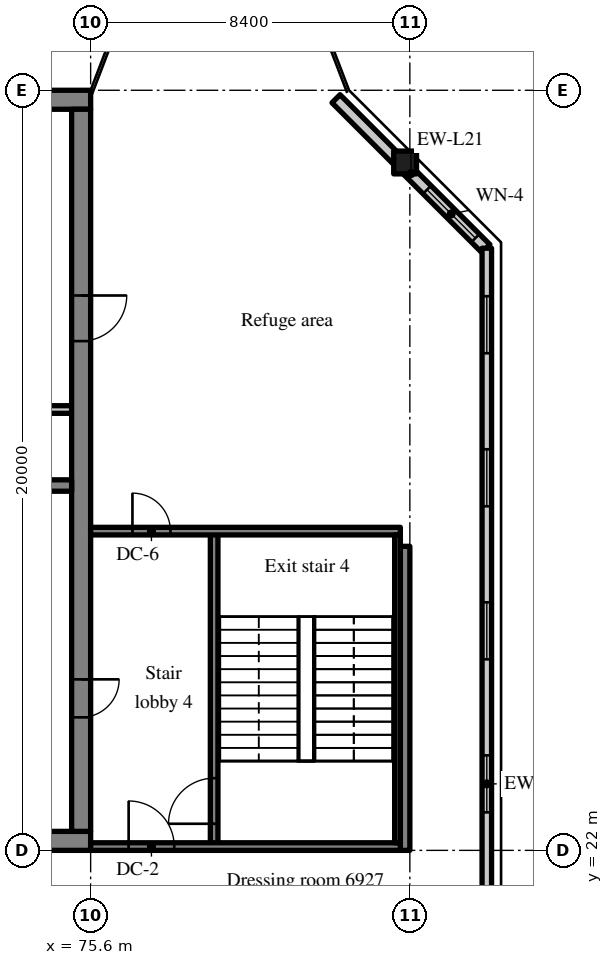
"""IFC4 building model, lengths in metres.
Left out: names, types, materials, properties, quantities, classifications, styles, units other than length and angle.
Written with IfcOpenShell. Run it as: python <this file> out.ifc"""

import sys

from ifc_helpers import new_model, si_unit, direction, frame, frame_2d, origin, origin_2d, place, context, subcontext, project, spatial, rectangle, extrude, source, transform, mapped, element, fill, save


model = new_model("IFC4")
c1 = context("Model", 3, precision=1e-05, world=origin(), true_north=direction((0.0, 1.0)))
c2 = subcontext(c1, "Body", "Model", "MODEL_VIEW")
j1 = project(units=[si_unit("LENGTHUNIT", "METRE"), si_unit("PLANEANGLEUNIT", "RADIAN")], contexts=[c1])
p1 = place(None, origin())
s1 = spatial("IfcSite", under=j1, at=p1, CompositionType="ELEMENT")
p2 = place(p1, origin())
s2 = spatial("IfcBuilding", under=s1, at=p2, CompositionType="ELEMENT")
p3 = place(p2, frame((0.0, 0.0, 289.7)))
s3 = spatial("IfcBuildingStorey", under=s2, at=p3, CompositionType="ELEMENT", Elevation=289.7)
m1 = source(origin(), c2, "Body", "SweptSolid", [
    extrude(rectangle(XDim=50.4, YDim=0.5, at=frame_2d((25.2, 0.0))), origin(), (0.0, 0.0, 1.0), 3.72),
])
p4 = place(p3, frame((25.2, 22.25, 0.0), z_axis=(0.0, 0.0, 1.0), x_axis=(1.0, 0.0, 0.0)))
e1 = element("IfcWall", 1, at=p4, inside=s3, PredefinedType="SHEAR", context=c2, shape_type="MappedRepresentation", body=[
    mapped(m1, transform((0.0, 0.0, 0.0), scale=1.0)),
])
m2 = source(origin(), c2, "Body", "SweptSolid", [
    extrude(rectangle(XDim=1.8, YDim=2.1, at=frame_2d((0.9, 1.05))), frame((0.0, 0.26, 0.0), z_axis=(0.0, -1.0, 0.0), x_axis=(1.0, 0.0, 0.0)), (0.0, 0.0, 1.0), 0.52),
])
p5 = place(p4, frame((15.9, 0.0, 0.0)))
e2 = element("IfcOpeningElement", 2, at=p5, cuts=e1, PredefinedType="OPENING", context=c2, shape_type="MappedRepresentation", body=[
    mapped(m2, transform((0.0, 0.0, 0.0), scale=1.0)),
])
m3 = source(origin(), c2, "Body", "SweptSolid", [
    extrude(rectangle(XDim=0.9, YDim=2.1, at=frame_2d((0.45, 1.05))), frame((0.0, 0.26, 0.0), z_axis=(0.0, -1.0, 0.0), x_axis=(1.0, 0.0, 0.0)), (0.0, 0.0, 1.0), 0.52),
])
p6 = place(p4, frame((9.675, 0.0, 0.0)))
e3 = element("IfcOpeningElement", 3, at=p6, cuts=e1, PredefinedType="OPENING", context=c2, shape_type="MappedRepresentation", body=[
    mapped(m3, transform((0.0, 0.0, 0.0), scale=1.0)),
])
p7 = place(p4, frame((21.525, 0.0, 0.0)))
e4 = element("IfcOpeningElement", 4, at=p7, cuts=e1, PredefinedType="OPENING", context=c2, shape_type="MappedRepresentation", body=[
    mapped(m3, transform((0.0, 0.0, 0.0), scale=1.0)),
])
p8 = place(p4, frame((32.7, 0.0, 0.0)))
e5 = element("IfcOpeningElement", 5, at=p8, cuts=e1, PredefinedType="OPENING", context=c2, shape_type="MappedRepresentation", body=[
    mapped(m2, transform((0.0, 0.0, 0.0), scale=1.0)),
])
m4 = source(origin(), c2, "Body", "SweptSolid", [
    extrude(rectangle(XDim=1.2, YDim=2.1, at=frame_2d((0.6, 1.05))), frame((0.0, 0.26, 0.0), z_axis=(0.0, -1.0, 0.0), x_axis=(1.0, 0.0, 0.0)), (0.0, 0.0, 1.0), 0.52),
])
p9 = place(p4, frame((6.5, 0.0, 0.0)))
e6 = element("IfcOpeningElement", 6, at=p9, cuts=e1, PredefinedType="OPENING", context=c2, shape_type="MappedRepresentation", body=[
    mapped(m4, transform((0.0, 0.0, 0.0), scale=1.0)),
])
p10 = place(p4, frame((47.975, 0.0, 0.0)))
e7 = element("IfcOpeningElement", 7, at=p10, cuts=e1, PredefinedType="OPENING", context=c2, shape_type="MappedRepresentation", body=[
    mapped(m4, transform((0.0, 0.0, 0.0), scale=1.0)),
])
p11 = place(p3, frame((25.2, 41.75, 0.0), z_axis=(0.0, 0.0, 1.0), x_axis=(1.0, 0.0, 0.0)))
e8 = element("IfcWall", 8, at=p11, inside=s3, PredefinedType="SHEAR", context=c2, shape_type="MappedRepresentation", body=[
    mapped(m1, transform((0.0, 0.0, 0.0), scale=1.0)),
])
m5 = source(origin(), c2, "Body", "SweptSolid", [
    extrude(rectangle(XDim=19.0, YDim=0.5, at=frame_2d((9.5, 0.0))), origin(), (0.0, 0.0, 1.0), 3.72),
])
p12 = place(p3, frame((75.35, 22.5, 0.0), z_axis=(0.0, 0.0, 1.0), x_axis=(0.0, 1.0, 0.0)))
e9 = element("IfcWall", 9, at=p12, inside=s3, PredefinedType="SHEAR", context=c2, shape_type="MappedRepresentation", body=[
    mapped(m5, transform((0.0, 0.0, 0.0), scale=1.0)),
])
m6 = source(origin(), c2, "Body", "SweptSolid", [
    extrude(rectangle(XDim=1.0, YDim=2.1, at=frame_2d((0.5, 1.05))), frame((0.0, 0.26, 0.0), z_axis=(0.0, -1.0, 0.0), x_axis=(1.0, 0.0, 0.0)), (0.0, 0.0, 1.0), 0.52),
])
p13 = place(p12, frame((3.0, 0.0, 0.0)))
e10 = element("IfcOpeningElement", 10, at=p13, cuts=e9, PredefinedType="OPENING", context=c2, shape_type="MappedRepresentation", body=[
    mapped(m6, transform((0.0, 0.0, 0.0), scale=1.0)),
])
p14 = place(p12, frame((12.9, 0.0, 0.0)))
e11 = element("IfcOpeningElement", 11, at=p14, cuts=e9, PredefinedType="OPENING", context=c2, shape_type="MappedRepresentation", body=[
    mapped(m4, transform((0.0, 0.0, 0.0), scale=1.0)),
])
m7 = source(origin(), c2, "Body", "SweptSolid", [
    extrude(rectangle(XDim=7.75, YDim=0.3, at=frame_2d((3.875, 0.0))), origin(), (0.0, 0.0, 1.0), 3.72),
])
p15 = place(p3, frame((67.35, 31.6, 0.0), z_axis=(0.0, 0.0, 1.0), x_axis=(1.0, 0.0, 0.0)))
e12 = element("IfcWall", 12, at=p15, inside=s3, PredefinedType="SHEAR", context=c2, shape_type="MappedRepresentation", body=[
    mapped(m7, transform((0.0, 0.0, 0.0), scale=1.0)),
])
m8 = source(origin(), c2, "Body", "SweptSolid", [
    extrude(rectangle(XDim=1.1, YDim=2.1, at=frame_2d((0.55, 1.05))), frame((0.0, 0.16, 0.0), z_axis=(0.0, -1.0, 0.0), x_axis=(1.0, 0.0, 0.0)), (0.0, 0.0, 1.0), 0.32),
])
p16 = place(p15, frame((5.875, 0.0, 0.0)))
e13 = element("IfcOpeningElement", 13, at=p16, cuts=e12, PredefinedType="OPENING", context=c2, shape_type="MappedRepresentation", body=[
    mapped(m8, transform((0.0, 0.0, 0.0), scale=1.0)),
])
m9 = source(origin(), c2, "Body", "SweptSolid", [
    extrude(rectangle(XDim=8.0, YDim=0.25, at=frame_2d((4.0, 0.0))), origin(), (0.0, 0.0, 1.0), 3.72),
])
p17 = place(p3, frame((83.875, 22.0, 0.0), z_axis=(0.0, 0.0, 1.0), x_axis=(0.0, 1.0, 0.0)))
e14 = element("IfcWall", 14, at=p17, inside=s3, PredefinedType="SHEAR", context=c2, shape_type="MappedRepresentation", body=[
    mapped(m9, transform((0.0, 0.0, 0.0), scale=1.0)),
])
m10 = source(origin(), c2, "Body", "SweptSolid", [
    extrude(rectangle(XDim=0.6, YDim=0.6, at=origin_2d()), origin(), (0.0, 0.0, 1.0), 3.72),
])
p18 = place(p3, frame((83.875, 40.1, 0.0), z_axis=(0.0, 0.0, 1.0), x_axis=(1.0, 0.0, 0.0)))
e15 = element("IfcColumn", 15, at=p18, inside=s3, PredefinedType="COLUMN", context=c2, shape_type="MappedRepresentation", body=[
    mapped(m10, transform((0.0, 0.0, 0.0), scale=1.0)),
])
m11 = source(origin(), c2, "Body", "SweptSolid", [
    extrude(rectangle(XDim=5.576, YDim=0.3, at=frame_2d((2.788, 0.0))), origin(), (0.0, 0.0, 1.0), 3.72),
])
p19 = place(p3, frame((86.0, 37.834, 0.0), z_axis=(0.0, 0.0, 1.0), x_axis=(-0.707106781187, 0.707106781187, 0.0)))
e16 = element("IfcWall", 16, at=p19, inside=s3, PredefinedType="SOLIDWALL", context=c2, shape_type="MappedRepresentation", body=[
    mapped(m11, transform((0.0, 0.0, 0.0), scale=1.0)),
])
m12 = source(origin(), c2, "Body", "SweptSolid", [
    extrude(rectangle(XDim=1.8, YDim=1.5, at=frame_2d((0.9, 0.75))), frame((0.0, 0.16, 0.0), z_axis=(0.0, -1.0, 0.0), x_axis=(1.0, 0.0, 0.0)), (0.0, 0.0, 1.0), 0.32),
])
p20 = place(p19, frame((0.39, 0.0, 0.9)))
e17 = element("IfcOpeningElement", 17, at=p20, cuts=e16, PredefinedType="OPENING", context=c2, shape_type="MappedRepresentation", body=[
    mapped(m12, transform((0.0, 0.0, 0.0), scale=1.0)),
])
m13 = source(origin(), c2, "Body", "SweptSolid", [
    extrude(rectangle(XDim=28.189, YDim=0.25, at=frame_2d((14.095, 0.0))), origin(), (0.0, 0.0, 1.0), 3.72),
])
p21 = place(p3, frame((86.025, 9.655, 0.0), z_axis=(0.0, 0.0, 1.0), x_axis=(0.0, 1.0, 0.0)))
e18 = element("IfcWall", 18, at=p21, inside=s3, PredefinedType="SOLIDWALL", context=c2, shape_type="MappedRepresentation", body=[
    mapped(m13, transform((0.0, 0.0, 0.0), scale=1.0)),
])
m14 = source(origin(), c2, "Body", "SweptSolid", [
    extrude(rectangle(XDim=1.5, YDim=1.5, at=frame_2d((0.75, 0.75))), frame((0.0, 0.135, 0.0), z_axis=(0.0, -1.0, 0.0), x_axis=(1.0, 0.0, 0.0)), (0.0, 0.0, 1.0), 0.27),
])
p22 = place(p21, frame((1.263, 0.0, 0.9)))
e19 = element("IfcOpeningElement", 19, at=p22, cuts=e18, PredefinedType="OPENING", context=c2, shape_type="MappedRepresentation", body=[
    mapped(m14, transform((0.0, 0.0, 0.0), scale=1.0)),
])
p23 = place(p21, frame((5.291, 0.0, 0.9)))
e20 = element("IfcOpeningElement", 20, at=p23, cuts=e18, PredefinedType="OPENING", context=c2, shape_type="MappedRepresentation", body=[
    mapped(m14, transform((0.0, 0.0, 0.0), scale=1.0)),
])
p24 = place(p21, frame((9.318, 0.0, 0.9)))
e21 = element("IfcOpeningElement", 21, at=p24, cuts=e18, PredefinedType="OPENING", context=c2, shape_type="MappedRepresentation", body=[
    mapped(m14, transform((0.0, 0.0, 0.0), scale=1.0)),
])
p25 = place(p21, frame((13.345, 0.0, 0.9)))
e22 = element("IfcOpeningElement", 22, at=p25, cuts=e18, PredefinedType="OPENING", context=c2, shape_type="MappedRepresentation", body=[
    mapped(m14, transform((0.0, 0.0, 0.0), scale=1.0)),
])
p26 = place(p21, frame((17.372, 0.0, 0.9)))
e23 = element("IfcOpeningElement", 23, at=p26, cuts=e18, PredefinedType="OPENING", context=c2, shape_type="MappedRepresentation", body=[
    mapped(m14, transform((0.0, 0.0, 0.0), scale=1.0)),
])
p27 = place(p21, frame((21.399, 0.0, 0.9)))
e24 = element("IfcOpeningElement", 24, at=p27, cuts=e18, PredefinedType="OPENING", context=c2, shape_type="MappedRepresentation", body=[
    mapped(m14, transform((0.0, 0.0, 0.0), scale=1.0)),
])
p28 = place(p21, frame((25.426, 0.0, 0.9)))
e25 = element("IfcOpeningElement", 25, at=p28, cuts=e18, PredefinedType="OPENING", context=c2, shape_type="MappedRepresentation", body=[
    mapped(m14, transform((0.0, 0.0, 0.0), scale=1.0)),
])
m15 = source(origin(), c2, "Body", "SweptSolid", [
    extrude(rectangle(XDim=2.65, YDim=0.2, at=frame_2d((1.325, 0.0))), origin(), (0.0, 0.0, 1.0), 3.72),
])
p29 = place(p3, frame((72.45, 33.6, 0.0), z_axis=(0.0, 0.0, 1.0), x_axis=(1.0, 0.0, 0.0)))
e26 = element("IfcWall", 26, at=p29, inside=s3, PredefinedType="SOLIDWALL", context=c2, shape_type="MappedRepresentation", body=[
    mapped(m15, transform((0.0, 0.0, 0.0), scale=1.0)),
])
m16 = source(origin(), c2, "Body", "SweptSolid", [
    extrude(rectangle(XDim=8.3, YDim=0.2, at=frame_2d((4.15, 0.0))), origin(), (0.0, 0.0, 1.0), 3.72),
])
p30 = place(p3, frame((78.85, 22.1, 0.0), z_axis=(0.0, 0.0, 1.0), x_axis=(0.0, 1.0, 0.0)))
e27 = element("IfcWall", 27, at=p30, inside=s3, PredefinedType="SOLIDWALL", context=c2, shape_type="MappedRepresentation", body=[
    mapped(m16, transform((0.0, 0.0, 0.0), scale=1.0)),
])
m17 = source(origin(), c2, "Body", "SweptSolid", [
    extrude(rectangle(XDim=1.2, YDim=2.1, at=frame_2d((0.6, 1.05))), frame((0.0, 0.11, 0.0), z_axis=(0.0, -1.0, 0.0), x_axis=(1.0, 0.0, 0.0)), (0.0, 0.0, 1.0), 0.22),
])
p31 = place(p30, frame((0.6, 0.0, 0.0)))
e28 = element("IfcOpeningElement", 28, at=p31, cuts=e27, PredefinedType="OPENING", context=c2, shape_type="MappedRepresentation", body=[
    mapped(m17, transform((0.0, 0.0, 0.0), scale=1.0)),
])
m18 = source(origin(), c2, "Body", "SweptSolid", [
    extrude(rectangle(XDim=8.15, YDim=0.2, at=frame_2d((4.075, 0.0))), origin(), (0.0, 0.0, 1.0), 3.72),
])
p32 = place(p3, frame((83.75, 22.1, 0.0), z_axis=(0.0, 0.0, 1.0), x_axis=(-1.0, 0.0, 0.0)))
e29 = element("IfcWall", 29, at=p32, inside=s3, PredefinedType="SOLIDWALL", context=c2, shape_type="MappedRepresentation", body=[
    mapped(m18, transform((0.0, 0.0, 0.0), scale=1.0)),
])
p33 = place(p32, frame((5.95, 0.0, 0.0)))
e30 = element("IfcOpeningElement", 30, at=p33, cuts=e29, PredefinedType="OPENING", context=c2, shape_type="MappedRepresentation", body=[
    mapped(m17, transform((0.0, 0.0, 0.0), scale=1.0)),
])
p34 = place(p3, frame((83.75, 30.4, 0.0), z_axis=(0.0, 0.0, 1.0), x_axis=(-1.0, 0.0, 0.0)))
e31 = element("IfcWall", 31, at=p34, inside=s3, PredefinedType="SOLIDWALL", context=c2, shape_type="MappedRepresentation", body=[
    mapped(m18, transform((0.0, 0.0, 0.0), scale=1.0)),
])
m19 = source(origin(), c2, "Body", "SweptSolid", [
    extrude(rectangle(XDim=1.0, YDim=2.1, at=frame_2d((0.5, 1.05))), frame((0.0, 0.11, 0.0), z_axis=(0.0, -1.0, 0.0), x_axis=(1.0, 0.0, 0.0)), (0.0, 0.0, 1.0), 0.22),
])
p35 = place(p34, frame((6.05, 0.0, 0.0)))
e32 = element("IfcOpeningElement", 32, at=p35, cuts=e31, PredefinedType="OPENING", context=c2, shape_type="MappedRepresentation", body=[
    mapped(m19, transform((0.0, 0.0, 0.0), scale=1.0)),
])
m20 = source(origin(), c2, "Body", "SweptSolid", [
    extrude(rectangle(XDim=8.1, YDim=0.15, at=frame_2d((4.05, 0.0))), origin(), (0.0, 0.0, 1.0), 3.72),
])
p36 = place(p3, frame((83.675, 22.2, 0.0), z_axis=(0.0, 0.0, 1.0), x_axis=(0.0, 1.0, 0.0)))
e33 = element("IfcWall", 33, at=p36, inside=s3, PredefinedType="SOLIDWALL", context=c2, shape_type="MappedRepresentation", body=[
    mapped(m20, transform((0.0, 0.0, 0.0), scale=1.0)),
])
m21 = source(origin(), c2, "Body", "SweptSolid", [
    extrude(rectangle(XDim=1.8, YDim=1.5, at=frame_2d((0.9, 0.75))), frame((0.0, 0.03, 0.0), z_axis=(0.0, -1.0, 0.0), x_axis=(1.0, 0.0, 0.0)), (0.0, 0.0, 1.0), 0.06),
])
p37 = place(p20, origin())
e34 = element("IfcWindow", 34, at=p37, inside=s3, PartitioningType="SINGLE_PANEL", PredefinedType="WINDOW", context=c2, shape_type="MappedRepresentation", body=[
    mapped(m21, transform((0.0, 0.0, 0.0), scale=1.0)),
])
fill(e17, e34)
m22 = source(origin(), c2, "Body", "SweptSolid", [
    extrude(rectangle(XDim=1.5, YDim=1.5, at=frame_2d((0.75, 0.75))), frame((0.0, 0.03, 0.0), z_axis=(0.0, -1.0, 0.0), x_axis=(1.0, 0.0, 0.0)), (0.0, 0.0, 1.0), 0.06),
])
p38 = place(p25, origin())
e35 = element("IfcWindow", 35, at=p38, inside=s3, PartitioningType="SINGLE_PANEL", PredefinedType="WINDOW", context=c2, shape_type="MappedRepresentation", body=[
    mapped(m22, transform((0.0, 0.0, 0.0), scale=1.0)),
])
fill(e22, e35)
p39 = place(p26, origin())
e36 = element("IfcWindow", 36, at=p39, inside=s3, PartitioningType="SINGLE_PANEL", PredefinedType="WINDOW", context=c2, shape_type="MappedRepresentation", body=[
    mapped(m22, transform((0.0, 0.0, 0.0), scale=1.0)),
])
fill(e23, e36)
p40 = place(p27, origin())
e37 = element("IfcWindow", 37, at=p40, inside=s3, PartitioningType="SINGLE_PANEL", PredefinedType="WINDOW", context=c2, shape_type="MappedRepresentation", body=[
    mapped(m22, transform((0.0, 0.0, 0.0), scale=1.0)),
])
fill(e24, e37)
p41 = place(p28, origin())
e38 = element("IfcWindow", 38, at=p41, inside=s3, PartitioningType="SINGLE_PANEL", PredefinedType="WINDOW", context=c2, shape_type="MappedRepresentation", body=[
    mapped(m22, transform((0.0, 0.0, 0.0), scale=1.0)),
])
fill(e25, e38)
m23 = source(origin(), c2, "Body", "SweptSolid", [
    extrude(rectangle(XDim=1.0, YDim=2.1, at=frame_2d((0.5, 1.05))), frame((0.0, 0.025, 0.0), z_axis=(0.0, -1.0, 0.0), x_axis=(1.0, 0.0, 0.0)), (0.0, 0.0, 1.0), 0.05),
])
p42 = place(p13, origin())
e39 = element("IfcDoor", 39, at=p42, inside=s3, OperationType="SINGLE_SWING_RIGHT", PredefinedType="DOOR", context=c2, shape_type="MappedRepresentation", body=[
    mapped(m23, transform((0.0, 0.0, 0.0), scale=1.0)),
])
fill(e10, e39)
m24 = source(origin(), c2, "Body", "SweptSolid", [
    extrude(rectangle(XDim=1.2, YDim=2.1, at=frame_2d((0.6, 1.05))), frame((0.0, 0.025, 0.0), z_axis=(0.0, -1.0, 0.0), x_axis=(1.0, 0.0, 0.0)), (0.0, 0.0, 1.0), 0.05),
])
p43 = place(p14, origin())
e40 = element("IfcDoor", 40, at=p43, inside=s3, OperationType="SINGLE_SWING_RIGHT", PredefinedType="DOOR", context=c2, shape_type="MappedRepresentation", body=[
    mapped(m24, transform((0.0, 0.0, 0.0), scale=1.0)),
])
fill(e11, e40)
p44 = place(p31, origin())
e41 = element("IfcDoor", 41, at=p44, inside=s3, OperationType="SINGLE_SWING_LEFT", PredefinedType="DOOR", context=c2, shape_type="MappedRepresentation", body=[
    mapped(m24, transform((0.0, 0.0, 0.0), scale=1.0)),
])
fill(e28, e41)
p45 = place(p33, origin())
e42 = element("IfcDoor", 42, at=p45, inside=s3, OperationType="SINGLE_SWING_RIGHT", PredefinedType="DOOR", context=c2, shape_type="MappedRepresentation", body=[
    mapped(m24, transform((0.0, 0.0, 0.0), scale=1.0)),
])
fill(e30, e42)
p46 = place(p35, origin())
e43 = element("IfcDoor", 43, at=p46, inside=s3, OperationType="SINGLE_SWING_RIGHT", PredefinedType="DOOR", context=c2, shape_type="MappedRepresentation", body=[
    mapped(m23, transform((0.0, 0.0, 0.0), scale=1.0)),
])
fill(e32, e43)
save(model, sys.argv[1])
